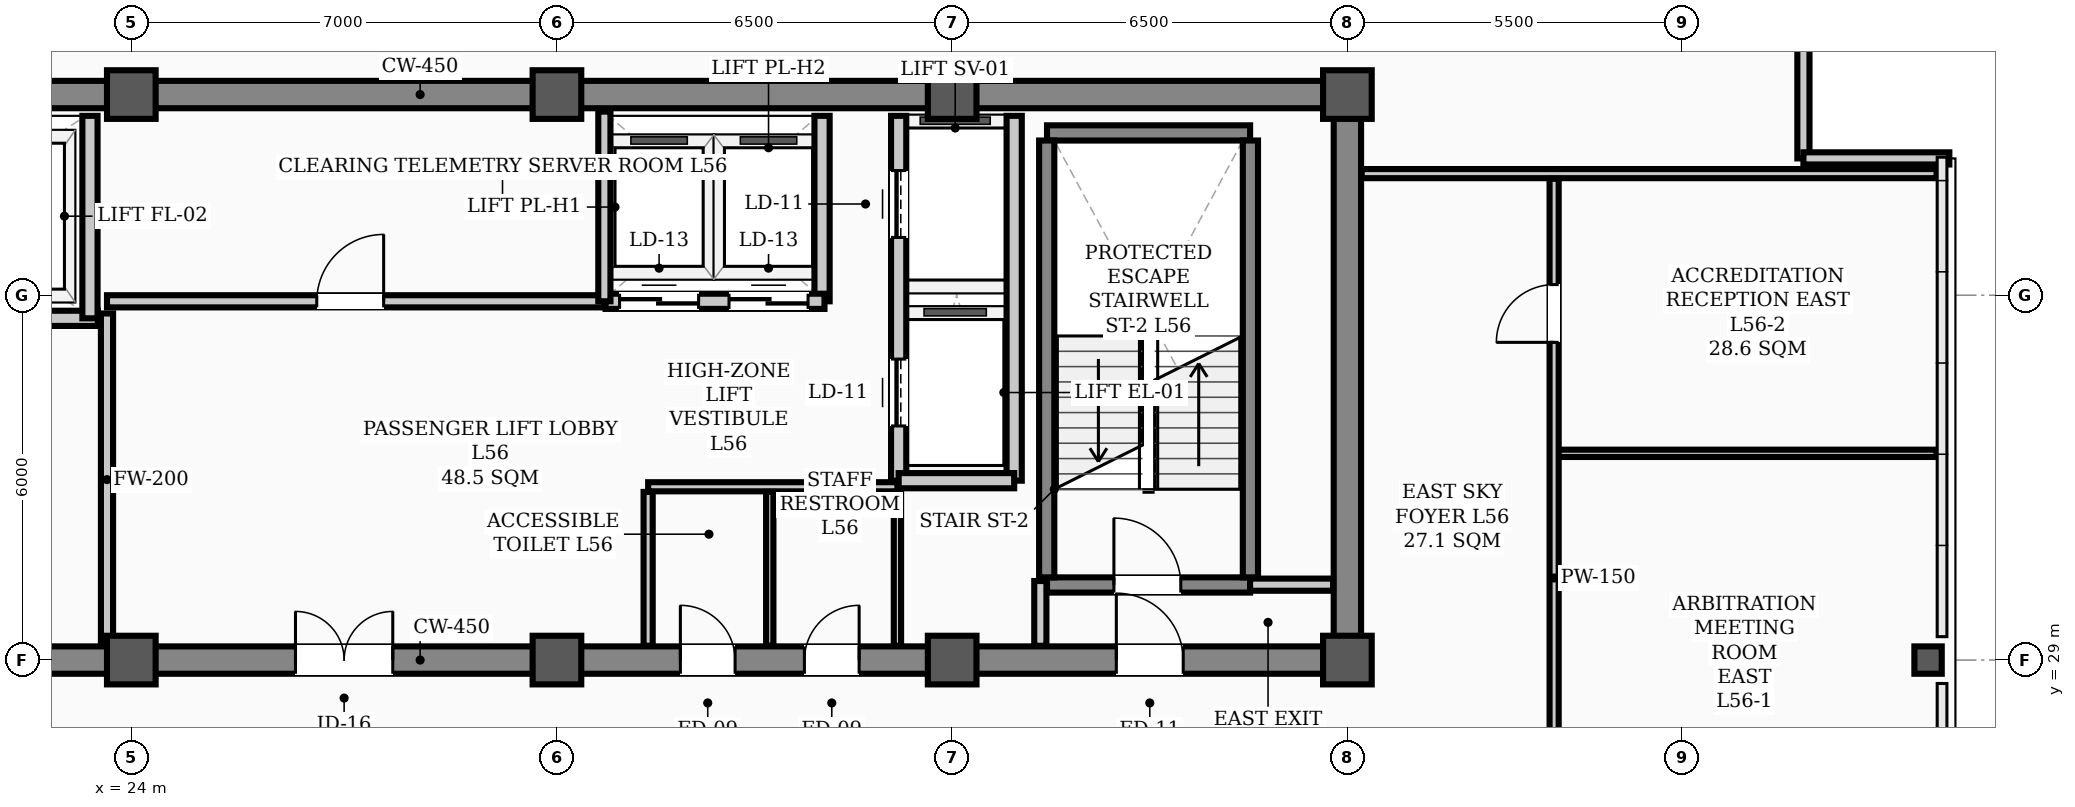
"""IFC4 building model, lengths in metres.
Left out: names, types, materials, properties, quantities, classifications, styles, units other than length and angle.
Written with IfcOpenShell. Run it as: python <this file> out.ifc"""

import sys

from ifc_helpers import new_model, si_unit, direction, frame, frame_2d, origin, origin_2d, place, context, subcontext, project, spatial, rectangle, hollow_rectangle, extrude, element, fill, save


model = new_model("IFC4")
c1 = context("Model", 3, precision=1e-05, world=origin(), true_north=direction((0.0, 1.0)))
c2 = subcontext(c1, "Body", "Model", "MODEL_VIEW")
j1 = project(units=[si_unit("LENGTHUNIT", "METRE"), si_unit("PLANEANGLEUNIT", "RADIAN")], contexts=[c1])
p1 = place(None, origin())
s1 = spatial("IfcSite", under=j1, at=p1, CompositionType="ELEMENT")
p2 = place(p1, origin())
s2 = spatial("IfcBuilding", under=s1, at=p2, CompositionType="ELEMENT")
p3 = place(p2, frame((0.0, 0.0, 226.7)))
s3 = spatial("IfcBuildingStorey", under=s2, at=p3, CompositionType="ELEMENT", Elevation=226.7)
for number, where, z_axis, x_axis in (
    (1, (24.0, 29.0, 0.0), (0.0, 0.0, 1.0), (1.0, 0.0, 0.0)),
    (2, (24.0, 38.3, 0.0), (0.0, 0.0, 1.0), (1.0, 0.0, 0.0)),
    (3, (31.0, 29.0, 0.0), (0.0, 0.0, 1.0), (1.0, 0.0, 0.0)),
    (4, (31.0, 38.3, 0.0), (0.0, 0.0, 1.0), (1.0, 0.0, 0.0)),
    (5, (37.5, 29.0, 0.0), (0.0, 0.0, 1.0), (1.0, 0.0, 0.0)),
    (6, (37.5, 38.3, 0.0), (0.0, 0.0, 1.0), (1.0, 0.0, 0.0)),
    (7, (44.0, 29.0, 0.0), (0.0, 0.0, 1.0), (1.0, 0.0, 0.0)),
    (8, (44.0, 38.3, 0.0), (0.0, 0.0, 1.0), (1.0, 0.0, 0.0)),
):
    element("IfcColumn", number, at=place(p3, frame(where, z_axis=z_axis, x_axis=x_axis)), inside=s3, PredefinedType="COLUMN", context=c2, shape_type="SweptSolid", body=[
        extrude(hollow_rectangle(XDim=0.8, YDim=0.8, WallThickness=0.032, InnerFilletRadius=0.016, OuterFilletRadius=0.048, at=origin_2d()), origin(), (0.0, 0.0, 1.0), 3.9),
    ])
p4 = place(p3, frame((53.55, 29.0, 0.0), z_axis=(0.0, 0.0, 1.0), x_axis=(1.0, 0.0, 0.0)))
e9 = element("IfcColumn", 9, at=p4, inside=s3, PredefinedType="COLUMN", context=c2, shape_type="SweptSolid", body=[
    extrude(hollow_rectangle(XDim=0.45, YDim=0.45, WallThickness=0.022, InnerFilletRadius=0.022, OuterFilletRadius=0.044, at=origin_2d()), origin(), (0.0, 0.0, 1.0), 3.66),
])
for number, where, z_axis, x_axis in (
    (10, (51.5, 39.65, 0.0), (0.0, 0.0, 1.0), (0.0, -1.0, 0.0)),
    (11, (51.5, 37.25, 0.0), (0.0, 0.0, 1.0), (1.0, 0.0, 0.0)),
):
    element("IfcWall", number, at=place(p3, frame(where, z_axis=z_axis, x_axis=x_axis)), inside=s3, PredefinedType="PARAPET", context=c2, shape_type="SweptSolid", body=[
        extrude(rectangle(XDim=2.4, YDim=0.2, at=frame_2d((1.2, 0.0))), origin(), (0.0, 0.0, 1.0), 1.2),
    ])
p5 = place(p3, frame((13.5, 29.0, 0.0), z_axis=(0.0, 0.0, 1.0), x_axis=(1.0, 0.0, 0.0)))
e12 = element("IfcWall", 12, at=p5, inside=s3, PredefinedType="SHEAR", context=c2, shape_type="SweptSolid", body=[
    extrude(rectangle(XDim=30.5, YDim=0.45, at=frame_2d((15.25, 0.0))), origin(), (0.0, 0.0, 1.0), 3.66),
])
p6 = place(p5, frame((1.75, 0.0, 0.0)))
e13 = element("IfcOpeningElement", 13, at=p6, cuts=e12, PredefinedType="OPENING", context=c2, shape_type="SweptSolid", body=[
    extrude(rectangle(XDim=1.1, YDim=2.08, at=frame_2d((0.55, 1.04))), frame((0.0, 0.235, 0.0), z_axis=(0.0, -1.0, 0.0), x_axis=(1.0, 0.0, 0.0)), (0.0, 0.0, 1.0), 0.47),
])
p7 = place(p5, frame((26.7, 0.0, 0.0)))
e14 = element("IfcOpeningElement", 14, at=p7, cuts=e12, PredefinedType="OPENING", context=c2, shape_type="SweptSolid", body=[
    extrude(rectangle(XDim=1.1, YDim=2.08, at=frame_2d((0.55, 1.04))), frame((0.0, 0.235, 0.0), z_axis=(0.0, -1.0, 0.0), x_axis=(1.0, 0.0, 0.0)), (0.0, 0.0, 1.0), 0.47),
])
p8 = place(p5, frame((6.8, 0.0, 0.0)))
e15 = element("IfcOpeningElement", 15, at=p8, cuts=e12, PredefinedType="OPENING", context=c2, shape_type="SweptSolid", body=[
    extrude(rectangle(XDim=1.1, YDim=2.08, at=frame_2d((0.55, 1.04))), frame((0.0, 0.235, 0.0), z_axis=(0.0, -1.0, 0.0), x_axis=(1.0, 0.0, 0.0)), (0.0, 0.0, 1.0), 0.47),
])
p9 = place(p5, frame((13.2, 0.0, 0.0)))
e16 = element("IfcOpeningElement", 16, at=p9, cuts=e12, PredefinedType="OPENING", context=c2, shape_type="SweptSolid", body=[
    extrude(rectangle(XDim=1.6, YDim=2.08, at=frame_2d((0.8, 1.04))), frame((0.0, 0.235, 0.0), z_axis=(0.0, -1.0, 0.0), x_axis=(1.0, 0.0, 0.0)), (0.0, 0.0, 1.0), 0.47),
])
p10 = place(p5, frame((19.53, 0.0, 0.0)))
e17 = element("IfcOpeningElement", 17, at=p10, cuts=e12, PredefinedType="OPENING", context=c2, shape_type="SweptSolid", body=[
    extrude(rectangle(XDim=0.9, YDim=2.08, at=frame_2d((0.45, 1.04))), frame((0.0, 0.235, 0.0), z_axis=(0.0, -1.0, 0.0), x_axis=(1.0, 0.0, 0.0)), (0.0, 0.0, 1.0), 0.47),
])
p11 = place(p5, frame((21.57, 0.0, 0.0)))
e18 = element("IfcOpeningElement", 18, at=p11, cuts=e12, PredefinedType="OPENING", context=c2, shape_type="SweptSolid", body=[
    extrude(rectangle(XDim=0.9, YDim=2.08, at=frame_2d((0.45, 1.04))), frame((0.0, 0.235, 0.0), z_axis=(0.0, -1.0, 0.0), x_axis=(1.0, 0.0, 0.0)), (0.0, 0.0, 1.0), 0.47),
])
p12 = place(p3, frame((13.5, 38.3, 0.0), z_axis=(0.0, 0.0, 1.0), x_axis=(1.0, 0.0, 0.0)))
e19 = element("IfcWall", 19, at=p12, inside=s3, PredefinedType="SHEAR", context=c2, shape_type="SweptSolid", body=[
    extrude(rectangle(XDim=30.5, YDim=0.45, at=frame_2d((15.25, 0.0))), origin(), (0.0, 0.0, 1.0), 3.66),
])
p13 = place(p3, frame((44.0, 29.35, 0.0), z_axis=(0.0, 0.0, 1.0), x_axis=(0.0, 1.0, 0.0)))
e20 = element("IfcWall", 20, at=p13, inside=s3, PredefinedType="SHEAR", context=c2, shape_type="SweptSolid", body=[
    extrude(rectangle(XDim=8.6, YDim=0.45, at=frame_2d((4.3, 0.0))), origin(), (0.0, 0.0, 1.0), 3.66),
])
p14 = place(p3, frame((39.06, 30.235, 0.0), z_axis=(0.0, 0.0, 1.0), x_axis=(1.0, 0.0, 0.0)))
e21 = element("IfcWall", 21, at=p14, inside=s3, PredefinedType="STANDARD", context=c2, shape_type="SweptSolid", body=[
    extrude(rectangle(XDim=3.34, YDim=0.25, at=frame_2d((1.67, 0.0))), origin(), (0.0, 0.0, 1.0), 3.66),
])
p15 = place(p14, frame((1.1, 0.0, 0.0)))
e22 = element("IfcOpeningElement", 22, at=p15, cuts=e21, PredefinedType="OPENING", context=c2, shape_type="SweptSolid", body=[
    extrude(rectangle(XDim=1.1, YDim=2.08, at=frame_2d((0.55, 1.04))), frame((0.0, 0.135, 0.0), z_axis=(0.0, -1.0, 0.0), x_axis=(1.0, 0.0, 0.0)), (0.0, 0.0, 1.0), 0.27),
])
p16 = place(p3, frame((39.06, 37.669, 0.0), z_axis=(0.0, 0.0, 1.0), x_axis=(1.0, 0.0, 0.0)))
e23 = element("IfcWall", 23, at=p16, inside=s3, PredefinedType="STANDARD", context=c2, shape_type="SweptSolid", body=[
    extrude(rectangle(XDim=3.34, YDim=0.25, at=frame_2d((1.67, 0.0))), origin(), (0.0, 0.0, 1.0), 3.66),
])
for number, where, z_axis, x_axis in (
    (24, (39.055, 30.36, 0.0), (0.0, 0.0, 1.0), (0.0, 1.0, 0.0)),
    (25, (42.405, 30.36, 0.0), (0.0, 0.0, 1.0), (0.0, 1.0, 0.0)),
):
    element("IfcWall", number, at=place(p3, frame(where, z_axis=z_axis, x_axis=x_axis)), inside=s3, PredefinedType="STANDARD", context=c2, shape_type="SweptSolid", body=[
        extrude(rectangle(XDim=7.184, YDim=0.25, at=frame_2d((3.592, 0.0))), origin(), (0.0, 0.0, 1.0), 3.66),
    ])
p17 = place(p3, frame((18.1, 34.62, 0.0), z_axis=(0.0, 0.0, 1.0), x_axis=(1.0, 0.0, 0.0)))
e26 = element("IfcWall", 26, at=p17, inside=s3, PredefinedType="STANDARD", context=c2, shape_type="SweptSolid", body=[
    extrude(rectangle(XDim=5.35, YDim=0.25, at=frame_2d((2.675, 0.0))), origin(), (0.0, 0.0, 1.0), 3.66),
])
p18 = place(p17, frame((0.85, 0.0, 0.0)))
e27 = element("IfcOpeningElement", 27, at=p18, cuts=e26, PredefinedType="OPENING", context=c2, shape_type="SweptSolid", body=[
    extrude(rectangle(XDim=1.1, YDim=2.08, at=frame_2d((0.55, 1.04))), frame((0.0, 0.135, 0.0), z_axis=(0.0, -1.0, 0.0), x_axis=(1.0, 0.0, 0.0)), (0.0, 0.0, 1.0), 0.27),
])
p19 = place(p17, frame((3.45, 0.0, 0.0)))
e28 = element("IfcOpeningElement", 28, at=p19, cuts=e26, PredefinedType="OPENING", context=c2, shape_type="SweptSolid", body=[
    extrude(rectangle(XDim=1.1, YDim=2.08, at=frame_2d((0.55, 1.04))), frame((0.0, 0.135, 0.0), z_axis=(0.0, -1.0, 0.0), x_axis=(1.0, 0.0, 0.0)), (0.0, 0.0, 1.0), 0.27),
])
p20 = place(p3, frame((36.62, 31.95, 0.0), z_axis=(0.0, 0.0, 1.0), x_axis=(0.0, 1.0, 0.0)))
e29 = element("IfcWall", 29, at=p20, inside=s3, PredefinedType="STANDARD", context=c2, shape_type="SweptSolid", body=[
    extrude(rectangle(XDim=6.0, YDim=0.25, at=frame_2d((3.0, 0.0))), origin(), (0.0, 0.0, 1.0), 2.24),
])
p21 = place(p20, frame((0.9, 0.0, 0.0)))
e30 = element("IfcOpeningElement", 30, at=p21, cuts=e29, PredefinedType="OPENING", context=c2, shape_type="SweptSolid", body=[
    extrude(rectangle(XDim=1.1, YDim=2.08, at=frame_2d((0.55, 1.04))), frame((0.0, 0.135, 0.0), z_axis=(0.0, -1.0, 0.0), x_axis=(1.0, 0.0, 0.0)), (0.0, 0.0, 1.0), 0.27),
])
p22 = place(p20, frame((4.0, 0.0, 0.0)))
e31 = element("IfcOpeningElement", 31, at=p22, cuts=e29, PredefinedType="OPENING", context=c2, shape_type="SweptSolid", body=[
    extrude(rectangle(XDim=1.1, YDim=2.08, at=frame_2d((0.55, 1.04))), frame((0.0, 0.135, 0.0), z_axis=(0.0, -1.0, 0.0), x_axis=(1.0, 0.0, 0.0)), (0.0, 0.0, 1.0), 0.27),
])
p23 = place(p3, frame((38.52, 31.95, 0.0), z_axis=(0.0, 0.0, 1.0), x_axis=(0.0, 1.0, 0.0)))
e32 = element("IfcWall", 32, at=p23, inside=s3, PredefinedType="STANDARD", context=c2, shape_type="SweptSolid", body=[
    extrude(rectangle(XDim=6.0, YDim=0.25, at=frame_2d((3.0, 0.0))), origin(), (0.0, 0.0, 1.0), 3.48),
])
p24 = place(p3, frame((36.62, 31.95, 0.0), z_axis=(0.0, 0.0, 1.0), x_axis=(1.0, 0.0, 0.0)))
e33 = element("IfcWall", 33, at=p24, inside=s3, PredefinedType="STANDARD", context=c2, shape_type="SweptSolid", body=[
    extrude(rectangle(XDim=1.9, YDim=0.25, at=frame_2d((0.95, 0.0))), origin(), (0.0, 0.0, 1.0), 3.48),
])
p25 = place(p3, frame((23.32, 34.62, 0.0), z_axis=(0.0, 0.0, 1.0), x_axis=(0.0, 1.0, 0.0)))
e34 = element("IfcWall", 34, at=p25, inside=s3, PredefinedType="STANDARD", context=c2, shape_type="SweptSolid", body=[
    extrude(rectangle(XDim=3.33, YDim=0.25, at=frame_2d((1.665, 0.0))), origin(), (0.0, 0.0, 1.0), 2.24),
])
p26 = place(p3, frame((35.36, 34.9, 0.0), z_axis=(0.0, 0.0, 1.0), x_axis=(0.0, 1.0, 0.0)))
e35 = element("IfcWall", 35, at=p26, inside=s3, PredefinedType="STANDARD", context=c2, shape_type="SweptSolid", body=[
    extrude(rectangle(XDim=3.05, YDim=0.25, at=frame_2d((1.525, 0.0))), origin(), (0.0, 0.0, 1.0), 2.24),
])
p27 = place(p3, frame((31.8, 34.9, 0.0), z_axis=(0.0, 0.0, 1.0), x_axis=(1.0, 0.0, 0.0)))
e36 = element("IfcWall", 36, at=p27, inside=s3, PredefinedType="STANDARD", context=c2, shape_type="SweptSolid", body=[
    extrude(rectangle(XDim=3.6, YDim=0.25, at=frame_2d((1.8, 0.0))), origin(), (0.0, 0.0, 1.0), 3.66),
])
p28 = place(p27, frame((0.23, 0.0, 0.0)))
e37 = element("IfcOpeningElement", 37, at=p28, cuts=e36, PredefinedType="OPENING", context=c2, shape_type="SweptSolid", body=[
    extrude(rectangle(XDim=1.3, YDim=2.08, at=frame_2d((0.65, 1.04))), frame((0.0, 0.135, 0.0), z_axis=(0.0, -1.0, 0.0), x_axis=(1.0, 0.0, 0.0)), (0.0, 0.0, 1.0), 0.27),
])
p29 = place(p27, frame((2.03, 0.0, 0.0)))
e38 = element("IfcOpeningElement", 38, at=p29, cuts=e36, PredefinedType="OPENING", context=c2, shape_type="SweptSolid", body=[
    extrude(rectangle(XDim=1.3, YDim=2.08, at=frame_2d((0.65, 1.04))), frame((0.0, 0.135, 0.0), z_axis=(0.0, -1.0, 0.0), x_axis=(1.0, 0.0, 0.0)), (0.0, 0.0, 1.0), 0.27),
])
p30 = place(p3, frame((42.4, 30.24, 0.0), z_axis=(0.0, 0.0, 1.0), x_axis=(1.0, 0.0, 0.0)))
e39 = element("IfcWall", 39, at=p30, inside=s3, PredefinedType="STANDARD", context=c2, shape_type="SweptSolid", body=[
    extrude(rectangle(XDim=1.365, YDim=0.2, at=frame_2d((0.683, 0.0))), origin(), (0.0, 0.0, 1.0), 2.24),
])
p31 = place(p3, frame((23.6, 34.9, 0.0), z_axis=(0.0, 0.0, 1.0), x_axis=(1.0, 0.0, 0.0)))
e40 = element("IfcWall", 40, at=p31, inside=s3, PredefinedType="STANDARD", context=c2, shape_type="SweptSolid", body=[
    extrude(rectangle(XDim=8.18, YDim=0.2, at=frame_2d((4.09, 0.0))), origin(), (0.0, 0.0, 1.0), 3.66),
])
p32 = place(p31, frame((3.45, 0.0, 0.0)))
e41 = element("IfcOpeningElement", 41, at=p32, cuts=e40, PredefinedType="OPENING", context=c2, shape_type="SweptSolid", body=[
    extrude(rectangle(XDim=1.1, YDim=2.08, at=frame_2d((0.55, 1.04))), frame((0.0, 0.11, 0.0), z_axis=(0.0, -1.0, 0.0), x_axis=(1.0, 0.0, 0.0)), (0.0, 0.0, 1.0), 0.22),
])
p33 = place(p3, frame((32.5, 31.85, 0.0), z_axis=(0.0, 0.0, 1.0), x_axis=(1.0, 0.0, 0.0)))
e42 = element("IfcWall", 42, at=p33, inside=s3, PredefinedType="PARTITIONING", context=c2, shape_type="SweptSolid", body=[
    extrude(rectangle(XDim=4.1, YDim=0.15, at=frame_2d((2.05, 0.0))), origin(), (0.0, 0.0, 1.0), 3.66),
])
p34 = place(p3, frame((44.235, 37.0, 0.0), z_axis=(0.0, 0.0, 1.0), x_axis=(1.0, 0.0, 0.0)))
e43 = element("IfcWall", 43, at=p34, inside=s3, PredefinedType="PARTITIONING", context=c2, shape_type="SweptSolid", body=[
    extrude(rectangle(XDim=9.455, YDim=0.15, at=frame_2d((4.728, 0.0))), origin(), (0.0, 0.0, 1.0), 2.24),
])
p35 = place(p3, frame((47.4, 32.4, 0.0), z_axis=(0.0, 0.0, 1.0), x_axis=(1.0, 0.0, 0.0)))
e44 = element("IfcWall", 44, at=p35, inside=s3, PredefinedType="PARTITIONING", context=c2, shape_type="SweptSolid", body=[
    extrude(rectangle(XDim=6.29, YDim=0.12, at=frame_2d((3.145, 0.0))), origin(), (0.0, 0.0, 1.0), 3.66),
])
p36 = place(p3, frame((38.95, 29.235, 0.0), z_axis=(0.0, 0.0, 1.0), x_axis=(0.0, 1.0, 0.0)))
e45 = element("IfcWall", 45, at=p36, inside=s3, PredefinedType="STANDARD", context=c2, shape_type="SweptSolid", body=[
    extrude(rectangle(XDim=1.065, YDim=0.2, at=frame_2d((0.532, 0.0))), origin(), (0.0, 0.0, 1.0), 2.24),
])
p37 = place(p3, frame((23.6, 29.235, 0.0), z_axis=(0.0, 0.0, 1.0), x_axis=(0.0, 1.0, 0.0)))
e46 = element("IfcWall", 46, at=p37, inside=s3, PredefinedType="STANDARD", context=c2, shape_type="SweptSolid", body=[
    extrude(rectangle(XDim=5.465, YDim=0.2, at=frame_2d((2.732, 0.0))), origin(), (0.0, 0.0, 1.0), 2.24),
])
p38 = place(p3, frame((32.5, 29.235, 0.0), z_axis=(0.0, 0.0, 1.0), x_axis=(0.0, 1.0, 0.0)))
e47 = element("IfcWall", 47, at=p38, inside=s3, PredefinedType="PARTITIONING", context=c2, shape_type="SweptSolid", body=[
    extrude(rectangle(XDim=2.53, YDim=0.15, at=frame_2d((1.265, 0.0))), origin(), (0.0, 0.0, 1.0), 2.24),
])
for number, where, z_axis, x_axis in (
    (48, (36.6, 29.235, 0.0), (0.0, 0.0, 1.0), (0.0, 1.0, 0.0)),
    (49, (34.5, 29.235, 0.0), (0.0, 0.0, 1.0), (0.0, 1.0, 0.0)),
):
    element("IfcWall", number, at=place(p3, frame(where, z_axis=z_axis, x_axis=x_axis)), inside=s3, PredefinedType="PARTITIONING", context=c2, shape_type="SweptSolid", body=[
        extrude(rectangle(XDim=2.53, YDim=0.12, at=frame_2d((1.265, 0.0))), origin(), (0.0, 0.0, 1.0), 2.24),
    ])
p39 = place(p3, frame((47.4, 23.785, 0.0), z_axis=(0.0, 0.0, 1.0), x_axis=(0.0, 1.0, 0.0)))
e50 = element("IfcWall", 50, at=p39, inside=s3, PredefinedType="PARTITIONING", context=c2, shape_type="SweptSolid", body=[
    extrude(rectangle(XDim=13.13, YDim=0.15, at=frame_2d((6.565, 0.0))), origin(), (0.0, 0.0, 1.0), 2.24),
])
p40 = place(p39, frame((0.64, 0.0, 0.0)))
e51 = element("IfcOpeningElement", 51, at=p40, cuts=e50, PredefinedType="OPENING", context=c2, shape_type="SweptSolid", body=[
    extrude(rectangle(XDim=0.95, YDim=2.08, at=frame_2d((0.475, 1.04))), frame((0.0, 0.085, 0.0), z_axis=(0.0, -1.0, 0.0), x_axis=(1.0, 0.0, 0.0)), (0.0, 0.0, 1.0), 0.17),
])
p41 = place(p39, frame((10.44, 0.0, 0.0)))
e52 = element("IfcOpeningElement", 52, at=p41, cuts=e50, PredefinedType="OPENING", context=c2, shape_type="SweptSolid", body=[
    extrude(rectangle(XDim=0.95, YDim=2.08, at=frame_2d((0.475, 1.04))), frame((0.0, 0.085, 0.0), z_axis=(0.0, -1.0, 0.0), x_axis=(1.0, 0.0, 0.0)), (0.0, 0.0, 1.0), 0.17),
])
p42 = place(p3, frame((31.78, 34.9, 0.0), z_axis=(0.0, 0.0, 1.0), x_axis=(0.0, 1.0, 0.0)))
e53 = element("IfcWall", 53, at=p42, inside=s3, PredefinedType="STANDARD", context=c2, shape_type="SweptSolid", body=[
    extrude(rectangle(XDim=3.12, YDim=0.2, at=frame_2d((1.56, 0.0))), origin(), (0.0, 0.0, 1.0), 2.24),
])
p43 = place(p15, origin())
e54 = element("IfcDoor", 54, at=p43, inside=s3, OperationType="SINGLE_SWING_LEFT", PredefinedType="DOOR", context=c2, shape_type="SweptSolid", body=[
    extrude(rectangle(XDim=1.1, YDim=2.08, at=frame_2d((0.55, 1.04))), frame((0.0, 0.025, 0.0), z_axis=(0.0, -1.0, 0.0), x_axis=(1.0, 0.0, 0.0)), (0.0, 0.0, 1.0), 0.05),
])
fill(e22, e54)
p44 = place(p7, origin())
e55 = element("IfcDoor", 55, at=p44, inside=s3, OperationType="SINGLE_SWING_LEFT", PredefinedType="DOOR", context=c2, shape_type="SweptSolid", body=[
    extrude(rectangle(XDim=1.1, YDim=2.08, at=frame_2d((0.55, 1.04))), frame((0.0, 0.025, 0.0), z_axis=(0.0, -1.0, 0.0), x_axis=(1.0, 0.0, 0.0)), (0.0, 0.0, 1.0), 0.05),
])
fill(e14, e55)
p45 = place(p9, origin())
e56 = element("IfcDoor", 56, at=p45, inside=s3, OperationType="DOUBLE_DOOR_SINGLE_SWING", PredefinedType="DOOR", context=c2, shape_type="SweptSolid", body=[
    extrude(rectangle(XDim=1.6, YDim=2.08, at=frame_2d((0.8, 1.04))), frame((0.0, 0.025, 0.0), z_axis=(0.0, -1.0, 0.0), x_axis=(1.0, 0.0, 0.0)), (0.0, 0.0, 1.0), 0.05),
])
fill(e16, e56)
p46 = place(p32, origin())
e57 = element("IfcDoor", 57, at=p46, inside=s3, OperationType="SINGLE_SWING_RIGHT", PredefinedType="DOOR", context=c2, shape_type="SweptSolid", body=[
    extrude(rectangle(XDim=1.1, YDim=2.08, at=frame_2d((0.55, 1.04))), frame((0.0, 0.025, 0.0), z_axis=(0.0, -1.0, 0.0), x_axis=(1.0, 0.0, 0.0)), (0.0, 0.0, 1.0), 0.05),
])
fill(e41, e57)
p47 = place(p10, origin())
e58 = element("IfcDoor", 58, at=p47, inside=s3, OperationType="SINGLE_SWING_LEFT", PredefinedType="DOOR", context=c2, shape_type="SweptSolid", body=[
    extrude(rectangle(XDim=0.9, YDim=2.08, at=frame_2d((0.45, 1.04))), frame((0.0, 0.025, 0.0), z_axis=(0.0, -1.0, 0.0), x_axis=(1.0, 0.0, 0.0)), (0.0, 0.0, 1.0), 0.05),
])
fill(e17, e58)
p48 = place(p11, origin())
e59 = element("IfcDoor", 59, at=p48, inside=s3, OperationType="SINGLE_SWING_RIGHT", PredefinedType="DOOR", context=c2, shape_type="SweptSolid", body=[
    extrude(rectangle(XDim=0.9, YDim=2.08, at=frame_2d((0.45, 1.04))), frame((0.0, 0.025, 0.0), z_axis=(0.0, -1.0, 0.0), x_axis=(1.0, 0.0, 0.0)), (0.0, 0.0, 1.0), 0.05),
])
fill(e18, e59)
p49 = place(p41, origin())
e60 = element("IfcDoor", 60, at=p49, inside=s3, OperationType="SINGLE_SWING_LEFT", PredefinedType="DOOR", context=c2, shape_type="SweptSolid", body=[
    extrude(rectangle(XDim=0.95, YDim=2.08, at=frame_2d((0.475, 1.04))), frame((0.0, 0.025, 0.0), z_axis=(0.0, -1.0, 0.0), x_axis=(1.0, 0.0, 0.0)), (0.0, 0.0, 1.0), 0.05),
])
fill(e52, e60)
p50 = place(p21, origin())
e61 = element("IfcDoor", 61, at=p50, inside=s3, OperationType="SLIDING_TO_LEFT", PredefinedType="DOOR", context=c2, shape_type="SweptSolid", body=[
    extrude(rectangle(XDim=1.1, YDim=2.08, at=frame_2d((0.55, 1.04))), frame((0.0, 0.025, 0.0), z_axis=(0.0, -1.0, 0.0), x_axis=(1.0, 0.0, 0.0)), (0.0, 0.0, 1.0), 0.05),
])
fill(e30, e61)
p51 = place(p22, origin())
e62 = element("IfcDoor", 62, at=p51, inside=s3, OperationType="SLIDING_TO_LEFT", PredefinedType="DOOR", context=c2, shape_type="SweptSolid", body=[
    extrude(rectangle(XDim=1.1, YDim=2.08, at=frame_2d((0.55, 1.04))), frame((0.0, 0.025, 0.0), z_axis=(0.0, -1.0, 0.0), x_axis=(1.0, 0.0, 0.0)), (0.0, 0.0, 1.0), 0.05),
])
fill(e31, e62)
p52 = place(p28, origin())
e63 = element("IfcDoor", 63, at=p52, inside=s3, OperationType="DOUBLE_DOOR_SLIDING", PredefinedType="DOOR", context=c2, shape_type="SweptSolid", body=[
    extrude(rectangle(XDim=1.3, YDim=2.08, at=frame_2d((0.65, 1.04))), frame((0.0, 0.025, 0.0), z_axis=(0.0, -1.0, 0.0), x_axis=(1.0, 0.0, 0.0)), (0.0, 0.0, 1.0), 0.05),
])
fill(e37, e63)
p53 = place(p29, origin())
e64 = element("IfcDoor", 64, at=p53, inside=s3, OperationType="DOUBLE_DOOR_SLIDING", PredefinedType="DOOR", context=c2, shape_type="SweptSolid", body=[
    extrude(rectangle(XDim=1.3, YDim=2.08, at=frame_2d((0.65, 1.04))), frame((0.0, 0.025, 0.0), z_axis=(0.0, -1.0, 0.0), x_axis=(1.0, 0.0, 0.0)), (0.0, 0.0, 1.0), 0.05),
])
fill(e38, e64)
save(model, sys.argv[1])
